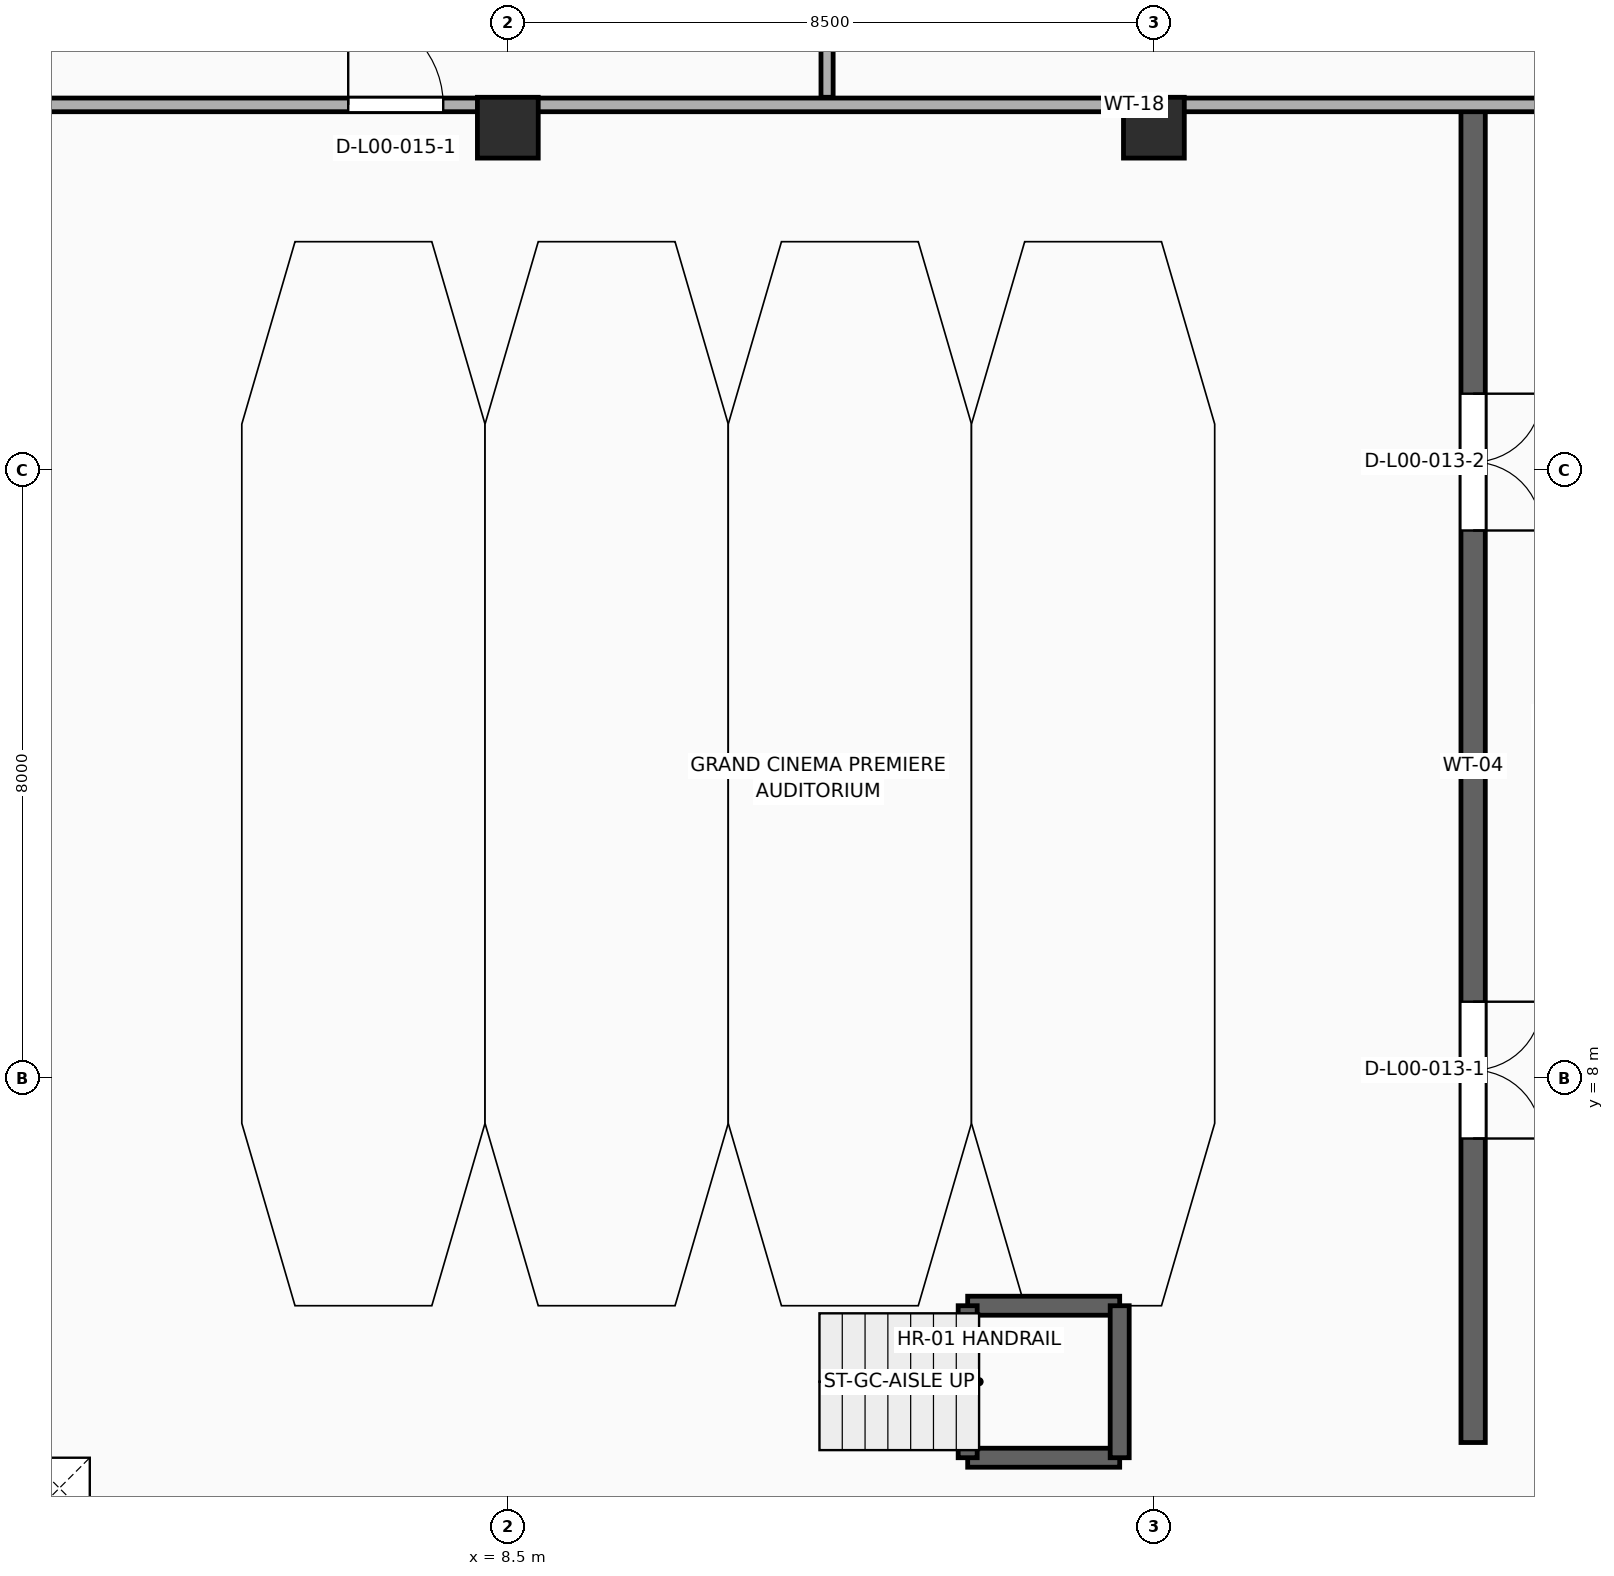
"""IFC4 building model, lengths in metres.
Left out: names, types, materials, properties, quantities, classifications, styles, units other than length and angle.
Written with IfcOpenShell. Run it as: python <this file> out.ifc"""

import sys

from ifc_helpers import new_model, si_unit, direction, frame, frame_2d, origin, origin_2d, place, context, subcontext, project, spatial, rectangle, extrude, element, fill, save


model = new_model("IFC4")
c1 = context("Model", 3, precision=1e-05, world=origin(), true_north=direction((0.0, 1.0)))
c2 = subcontext(c1, "Body", "Model", "MODEL_VIEW")
j1 = project(units=[si_unit("LENGTHUNIT", "METRE"), si_unit("PLANEANGLEUNIT", "RADIAN")], contexts=[c1])
p1 = place(None, origin())
s1 = spatial("IfcSite", under=j1, at=p1, CompositionType="ELEMENT")
p2 = place(p1, origin())
s2 = spatial("IfcBuilding", under=s1, at=p2, CompositionType="ELEMENT")
p3 = place(p2, origin())
s3 = spatial("IfcBuildingStorey", under=s2, at=p3, CompositionType="ELEMENT", Elevation=0.0)
for number, where, z_axis, x_axis in (
    (1, (8.5, 20.5, 0.0), (0.0, 0.0, 1.0), (1.0, 0.0, 0.0)),
    (2, (17.0, 20.5, 0.0), (0.0, 0.0, 1.0), (1.0, 0.0, 0.0)),
):
    element("IfcColumn", number, at=place(p3, frame(where, z_axis=z_axis, x_axis=x_axis)), inside=s3, PredefinedType="COLUMN", context=c2, shape_type="SweptSolid", body=[
        extrude(rectangle(XDim=0.8, YDim=0.8, at=origin_2d()), origin(), (0.0, 0.0, 1.0), 5.14),
    ])
for number, where, z_axis, x_axis in (
    (3, (14.55, 3.0, -0.34), (0.0, 0.0, 1.0), (1.0, 0.0, 0.0)),
    (4, (14.55, 5.0, -0.34), (0.0, 0.0, 1.0), (1.0, 0.0, 0.0)),
    (5, (16.55, 3.0, -0.34), (0.0, 0.0, 1.0), (0.0, 1.0, 0.0)),
    (6, (14.55, 3.0, -0.34), (0.0, 0.0, 1.0), (0.0, 1.0, 0.0)),
):
    element("IfcWall", number, at=place(p3, frame(where, z_axis=z_axis, x_axis=x_axis)), inside=s3, PredefinedType="STANDARD", context=c2, shape_type="SweptSolid", body=[
        extrude(rectangle(XDim=2.0, YDim=0.25, at=frame_2d((1.0, 0.0))), origin(), (0.0, 0.0, 1.0), 1.25),
    ])
p4 = place(p3, frame((21.2, 3.2, 0.0), z_axis=(0.0, 0.0, 1.0), x_axis=(0.0, 1.0, 0.0)))
e7 = element("IfcWall", 7, at=p4, inside=s3, PredefinedType="SHEAR", context=c2, shape_type="SweptSolid", body=[
    extrude(rectangle(XDim=17.6, YDim=0.32, at=frame_2d((8.8, 0.0))), origin(), (0.0, 0.0, 1.0), 5.1),
])
p5 = place(p4, frame((4.0, 0.0, 0.0)))
e8 = element("IfcOpeningElement", 8, at=p5, cuts=e7, PredefinedType="OPENING", context=c2, shape_type="SweptSolid", body=[
    extrude(rectangle(XDim=1.8, YDim=2.4, at=frame_2d((0.9, 1.2))), frame((0.0, 0.172, 0.0), z_axis=(0.0, -1.0, 0.0), x_axis=(1.0, 0.0, 0.0)), (0.0, 0.0, 1.0), 0.344),
])
p6 = place(p4, frame((12.0, 0.0, 0.0)))
e9 = element("IfcOpeningElement", 9, at=p6, cuts=e7, PredefinedType="OPENING", context=c2, shape_type="SweptSolid", body=[
    extrude(rectangle(XDim=1.8, YDim=2.4, at=frame_2d((0.9, 1.2))), frame((0.0, 0.172, 0.0), z_axis=(0.0, -1.0, 0.0), x_axis=(1.0, 0.0, 0.0)), (0.0, 0.0, 1.0), 0.344),
])
p7 = place(p3, frame((0.4, 20.8, 0.0), z_axis=(0.0, 0.0, 1.0), x_axis=(1.0, 0.0, 0.0)))
e10 = element("IfcWall", 10, at=p7, inside=s3, PredefinedType="PARTITIONING", context=c2, shape_type="SweptSolid", body=[
    extrude(rectangle(XDim=24.8, YDim=0.18, at=frame_2d((12.4, 0.0))), origin(), (0.0, 0.0, 1.0), 4.18),
])
p8 = place(p7, frame((6.0, 0.0, 0.0)))
e11 = element("IfcOpeningElement", 11, at=p8, cuts=e10, PredefinedType="OPENING", context=c2, shape_type="SweptSolid", body=[
    extrude(rectangle(XDim=1.25, YDim=2.25, at=frame_2d((0.625, 1.125))), frame((0.0, 0.102, 0.0), z_axis=(0.0, -1.0, 0.0), x_axis=(1.0, 0.0, 0.0)), (0.0, 0.0, 1.0), 0.204),
])
p9 = place(p3, frame((12.7, 20.9, 0.0), z_axis=(0.0, 0.0, 1.0), x_axis=(0.0, 1.0, 0.0)))
e12 = element("IfcWall", 12, at=p9, inside=s3, PredefinedType="PARTITIONING", context=c2, shape_type="SweptSolid", body=[
    extrude(rectangle(XDim=10.9, YDim=0.16, at=frame_2d((5.45, 0.0))), origin(), (0.0, 0.0, 1.0), 4.33),
])
p10 = place(p9, frame((4.5, 0.0, 0.0)))
e13 = element("IfcOpeningElement", 13, at=p10, cuts=e12, PredefinedType="OPENING", context=c2, shape_type="SweptSolid", body=[
    extrude(rectangle(XDim=1.0, YDim=2.15, at=frame_2d((0.5, 1.075))), frame((0.0, 0.092, 0.0), z_axis=(0.0, -1.0, 0.0), x_axis=(1.0, 0.0, 0.0)), (0.0, 0.0, 1.0), 0.184),
])
p11 = place(p5, frame((1.8, 0.0, 0.0), z_axis=(0.0, 0.0, 1.0), x_axis=(-1.0, 0.0, 0.0)))
e14 = element("IfcDoor", 14, at=p11, inside=s3, OperationType="DOUBLE_DOOR_SINGLE_SWING", PredefinedType="DOOR", context=c2, shape_type="SweptSolid", body=[
    extrude(rectangle(XDim=1.8, YDim=2.4, at=frame_2d((0.9, 1.2))), frame((0.0, 0.025, 0.0), z_axis=(0.0, -1.0, 0.0), x_axis=(1.0, 0.0, 0.0)), (0.0, 0.0, 1.0), 0.05),
])
fill(e8, e14)
p12 = place(p6, frame((1.8, 0.0, 0.0), z_axis=(0.0, 0.0, 1.0), x_axis=(-1.0, 0.0, 0.0)))
e15 = element("IfcDoor", 15, at=p12, inside=s3, OperationType="DOUBLE_DOOR_SINGLE_SWING", PredefinedType="DOOR", context=c2, shape_type="SweptSolid", body=[
    extrude(rectangle(XDim=1.8, YDim=2.4, at=frame_2d((0.9, 1.2))), frame((0.0, 0.025, 0.0), z_axis=(0.0, -1.0, 0.0), x_axis=(1.0, 0.0, 0.0)), (0.0, 0.0, 1.0), 0.05),
])
fill(e9, e15)
p13 = place(p8, origin())
e16 = element("IfcDoor", 16, at=p13, inside=s3, OperationType="SINGLE_SWING_LEFT", PredefinedType="DOOR", context=c2, shape_type="SweptSolid", body=[
    extrude(rectangle(XDim=1.25, YDim=2.25, at=frame_2d((0.625, 1.125))), frame((0.0, 0.025, 0.0), z_axis=(0.0, -1.0, 0.0), x_axis=(1.0, 0.0, 0.0)), (0.0, 0.0, 1.0), 0.05),
])
fill(e11, e16)
save(model, sys.argv[1])
